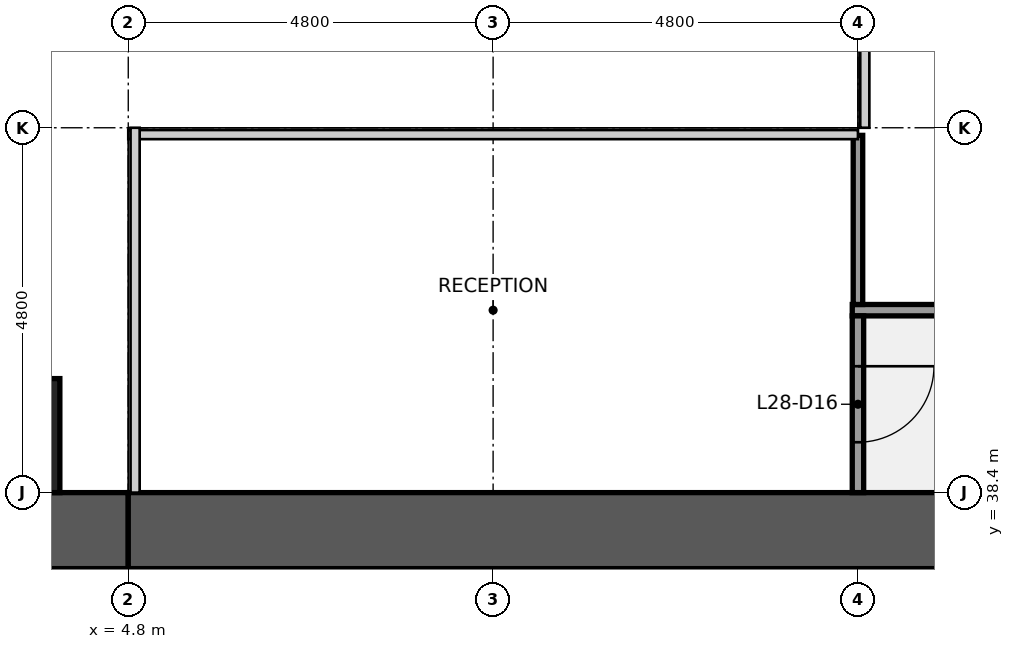
"""IFC4 building model, lengths in metres.
Left out: names, types, materials, properties, quantities, classifications, styles, units other than length and angle.
Written with IfcOpenShell. Run it as: python <this file> out.ifc"""

import sys

from ifc_helpers import new_model, si_unit, direction, frame, frame_2d, origin, origin_2d, place, context, subcontext, project, spatial, rectangle, extrude, element, fill, save


model = new_model("IFC4")
c1 = context("Model", 3, precision=1e-05, world=origin(), true_north=direction((0.0, 1.0)))
c2 = subcontext(c1, "Body", "Model", "MODEL_VIEW")
j1 = project(units=[si_unit("LENGTHUNIT", "METRE"), si_unit("PLANEANGLEUNIT", "RADIAN")], contexts=[c1])
p1 = place(None, origin())
s1 = spatial("IfcSite", under=j1, at=p1, CompositionType="ELEMENT")
p2 = place(p1, origin())
s2 = spatial("IfcBuilding", under=s1, at=p2, CompositionType="ELEMENT")
p3 = place(p2, frame((0.0, 0.0, 132.1)))
s3 = spatial("IfcBuildingStorey", under=s2, at=p3, CompositionType="ELEMENT", Elevation=132.1)
p4 = place(p3, frame((6.25, 37.3, 0.0), z_axis=(0.0, 0.0, 1.0), x_axis=(1.0, 0.0, 0.0)))
e1 = element("IfcWall", 1, at=p4, inside=s3, PredefinedType="SHEAR", context=c2, shape_type="SweptSolid", body=[
    extrude(rectangle(XDim=7.5, YDim=0.2, at=frame_2d((3.75, 0.0))), origin(), (0.0, 0.0, 1.0), 3.84),
])
p5 = place(p3, frame((1.0, 37.9, 0.0), z_axis=(0.0, 0.0, 1.0), x_axis=(1.0, 0.0, 0.0)))
e2 = element("IfcWall", 2, at=p5, inside=s3, PredefinedType="SHEAR", context=c2, shape_type="SweptSolid", body=[
    extrude(rectangle(XDim=3.8, YDim=1.0, at=frame_2d((1.9, 0.0))), origin(), (0.0, 0.0, 1.0), 3.84),
])
p6 = place(p3, frame((4.8, 37.9, 0.0), z_axis=(0.0, 0.0, 1.0), x_axis=(1.0, 0.0, 0.0)))
e3 = element("IfcWall", 3, at=p6, inside=s3, PredefinedType="SHEAR", context=c2, shape_type="SweptSolid", body=[
    extrude(rectangle(XDim=13.4, YDim=1.0, at=frame_2d((6.7, 0.0))), origin(), (0.0, 0.0, 1.0), 3.84),
])
p7 = place(p6, frame((11.45, 0.0, 0.0)))
e4 = element("IfcOpeningElement", 4, at=p7, cuts=e3, PredefinedType="OPENING", context=c2, shape_type="SweptSolid", body=[
    extrude(rectangle(XDim=1.1, YDim=2.1, at=frame_2d((0.55, 1.05))), frame((0.0, 0.51, 0.0), z_axis=(0.0, -1.0, 0.0), x_axis=(1.0, 0.0, 0.0)), (0.0, 0.0, 1.0), 1.02),
])
p8 = place(p3, frame((14.325, 40.8, 0.0), z_axis=(0.0, 0.0, 1.0), x_axis=(1.0, 0.0, 0.0)))
e5 = element("IfcWall", 5, at=p8, inside=s3, PredefinedType="PARTITIONING", context=c2, shape_type="SweptSolid", body=[
    extrude(rectangle(XDim=28.95, YDim=0.15, at=frame_2d((14.475, 0.0))), origin(), (0.0, 0.0, 1.0), 2.936),
])
p9 = place(p8, frame((1.975, 0.0, 0.0)))
e6 = element("IfcOpeningElement", 6, at=p9, cuts=e5, PredefinedType="OPENING", context=c2, shape_type="SweptSolid", body=[
    extrude(rectangle(XDim=1.0, YDim=2.1, at=frame_2d((0.5, 1.05))), frame((0.0, 0.085, 0.0), z_axis=(0.0, -1.0, 0.0), x_axis=(1.0, 0.0, 0.0)), (0.0, 0.0, 1.0), 0.17),
])
p10 = place(p8, frame((7.975, 0.0, 0.0)))
e7 = element("IfcOpeningElement", 7, at=p10, cuts=e5, PredefinedType="OPENING", context=c2, shape_type="SweptSolid", body=[
    extrude(rectangle(XDim=1.0, YDim=2.1, at=frame_2d((0.5, 1.05))), frame((0.0, 0.085, 0.0), z_axis=(0.0, -1.0, 0.0), x_axis=(1.0, 0.0, 0.0)), (0.0, 0.0, 1.0), 0.17),
])
p11 = place(p8, frame((12.775, 0.0, 0.0)))
e8 = element("IfcOpeningElement", 8, at=p11, cuts=e5, PredefinedType="OPENING", context=c2, shape_type="SweptSolid", body=[
    extrude(rectangle(XDim=1.0, YDim=2.1, at=frame_2d((0.5, 1.05))), frame((0.0, 0.085, 0.0), z_axis=(0.0, -1.0, 0.0), x_axis=(1.0, 0.0, 0.0)), (0.0, 0.0, 1.0), 0.17),
])
p12 = place(p8, frame((18.775, 0.0, 0.0)))
e9 = element("IfcOpeningElement", 9, at=p12, cuts=e5, PredefinedType="OPENING", context=c2, shape_type="SweptSolid", body=[
    extrude(rectangle(XDim=1.0, YDim=2.1, at=frame_2d((0.5, 1.05))), frame((0.0, 0.085, 0.0), z_axis=(0.0, -1.0, 0.0), x_axis=(1.0, 0.0, 0.0)), (0.0, 0.0, 1.0), 0.17),
])
p13 = place(p8, frame((25.975, 0.0, 0.0)))
e10 = element("IfcOpeningElement", 10, at=p13, cuts=e5, PredefinedType="OPENING", context=c2, shape_type="SweptSolid", body=[
    extrude(rectangle(XDim=1.0, YDim=2.1, at=frame_2d((0.5, 1.05))), frame((0.0, 0.085, 0.0), z_axis=(0.0, -1.0, 0.0), x_axis=(1.0, 0.0, 0.0)), (0.0, 0.0, 1.0), 0.17),
])
p14 = place(p3, frame((14.4, 40.875, 0.0), z_axis=(0.0, 0.0, 1.0), x_axis=(0.0, 1.0, 0.0)))
e11 = element("IfcWall", 11, at=p14, inside=s3, PredefinedType="PARTITIONING", context=c2, shape_type="SweptSolid", body=[
    extrude(rectangle(XDim=2.225, YDim=0.125, at=frame_2d((1.113, 0.0))), origin(), (0.0, 0.0, 1.0), 2.936),
])
p15 = place(p3, frame((14.4, 38.4, 0.0), z_axis=(0.0, 0.0, 1.0), x_axis=(0.0, 1.0, 0.0)))
e12 = element("IfcWall", 12, at=p15, inside=s3, PredefinedType="PARTITIONING", context=c2, shape_type="SweptSolid", body=[
    extrude(rectangle(XDim=2.325, YDim=0.15, at=frame_2d((1.163, 0.0))), origin(), (0.0, 0.0, 1.0), 2.936),
])
p16 = place(p15, frame((0.663, 0.0, 0.0)))
e13 = element("IfcOpeningElement", 13, at=p16, cuts=e12, PredefinedType="OPENING", context=c2, shape_type="SweptSolid", body=[
    extrude(rectangle(XDim=1.0, YDim=2.1, at=frame_2d((0.5, 1.05))), frame((0.0, 0.085, 0.0), z_axis=(0.0, -1.0, 0.0), x_axis=(1.0, 0.0, 0.0)), (0.0, 0.0, 1.0), 0.17),
])
p17 = place(p3, frame((2.4, 39.15, 0.0), z_axis=(0.0, 0.0, 1.0), x_axis=(1.0, 0.0, 0.0)))
e14 = element("IfcColumn", 14, at=p17, inside=s3, PredefinedType="PILASTER", context=c2, shape_type="SweptSolid", body=[
    extrude(rectangle(XDim=3.0, YDim=1.5, at=origin_2d()), origin(), (0.0, 0.0, 1.0), 4.0),
])
p18 = place(p16, origin())
e15 = element("IfcDoor", 15, at=p18, inside=s3, OperationType="SINGLE_SWING_RIGHT", PredefinedType="DOOR", context=c2, shape_type="SweptSolid", body=[
    extrude(rectangle(XDim=1.0, YDim=2.1, at=frame_2d((0.5, 1.05))), frame((0.0, 0.025, 0.0), z_axis=(0.0, -1.0, 0.0), x_axis=(1.0, 0.0, 0.0)), (0.0, 0.0, 1.0), 0.05),
])
fill(e13, e15)
save(model, sys.argv[1])
